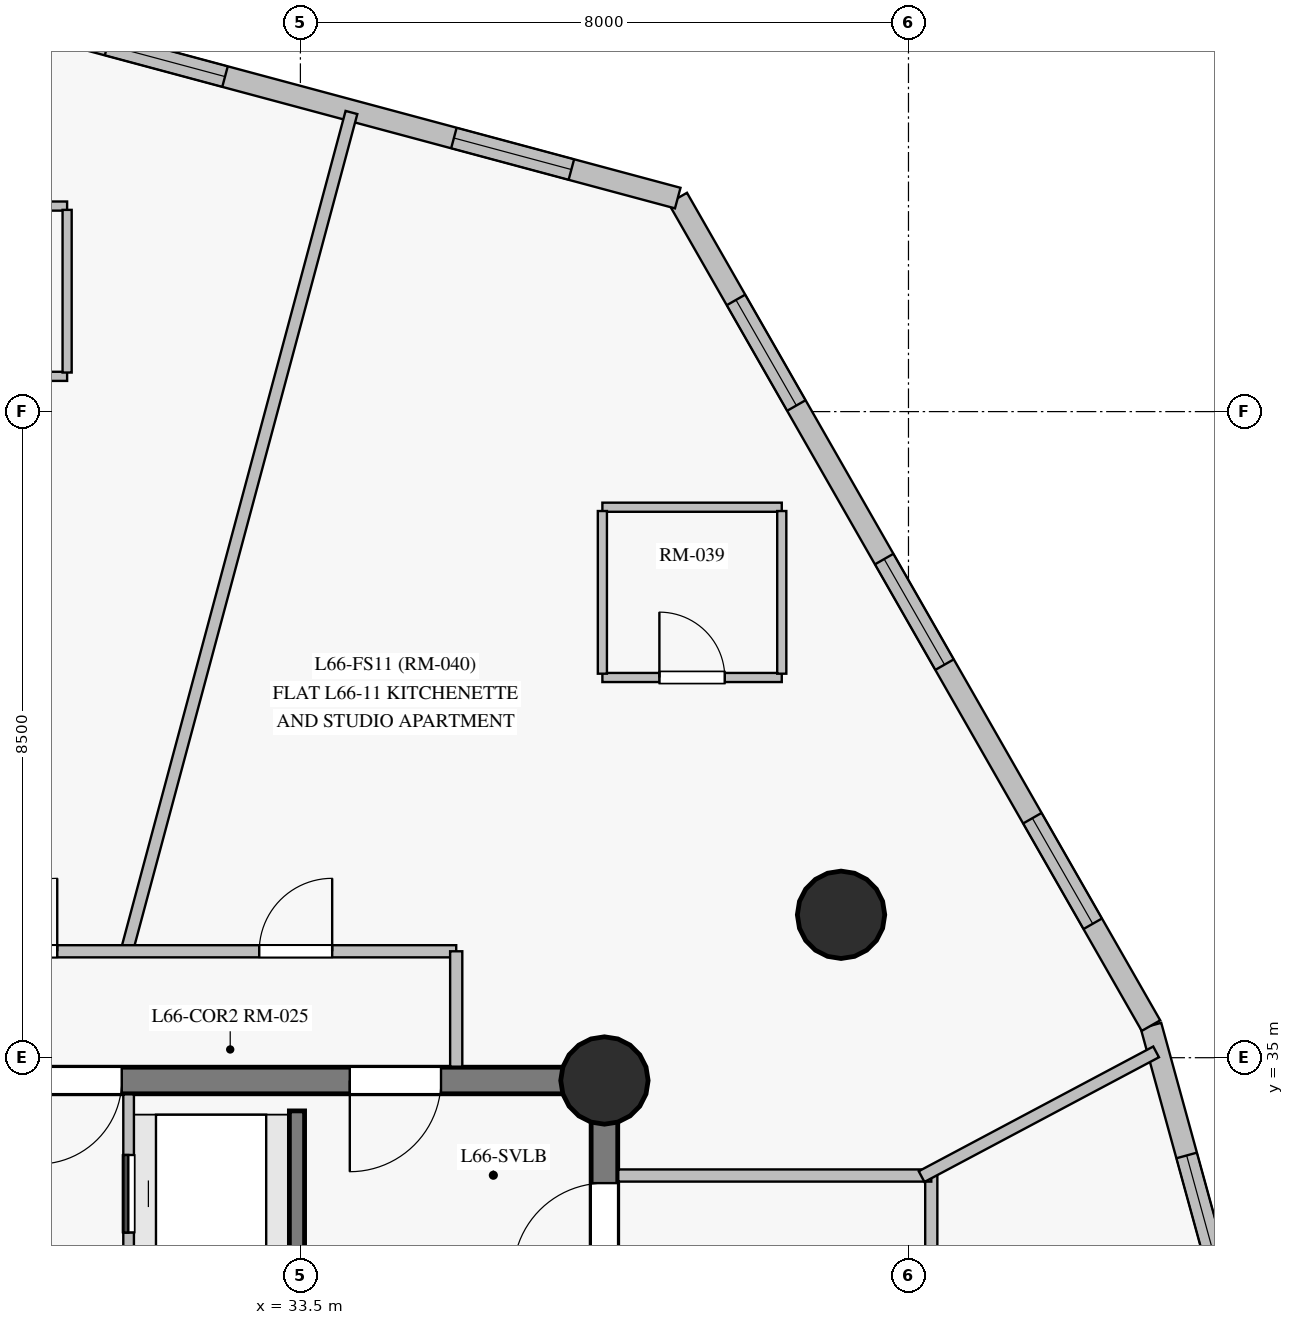
"""IFC4 building model, lengths in metres.
Left out: names, types, materials, properties, quantities, classifications, styles, units other than length and angle.
Written with IfcOpenShell. Run it as: python <this file> out.ifc"""

import sys

from ifc_helpers import new_model, si_unit, direction, frame, frame_2d, origin, origin_with_axes, origin_2d, place, context, subcontext, project, spatial, rectangle, circle, extrude, source, transform, mapped, element, fill, save


model = new_model("IFC4")
c1 = context("Model", 3, precision=1e-05, world=origin(), true_north=direction((0.0, 1.0)))
c2 = subcontext(c1, "Body", "Model", "MODEL_VIEW")
j1 = project(units=[si_unit("LENGTHUNIT", "METRE"), si_unit("PLANEANGLEUNIT", "RADIAN")], contexts=[c1])
p1 = place(None, origin())
s1 = spatial("IfcSite", under=j1, at=p1, CompositionType="ELEMENT")
p2 = place(p1, origin())
s2 = spatial("IfcBuilding", under=s1, at=p2, CompositionType="ELEMENT")
p3 = place(p2, frame((0.0, 0.0, 226.05)))
s3 = spatial("IfcBuildingStorey", under=s2, at=p3, CompositionType="ELEMENT", Elevation=226.05)
p4 = place(p3, frame((37.5, 18.3, 0.0), z_axis=(0.0, 0.0, 1.0), x_axis=(0.0, 1.0, 0.0)))
e1 = element("IfcWall", 1, at=p4, inside=s3, PredefinedType="SHEAR", context=c2, shape_type="SweptSolid", body=[
    extrude(rectangle(XDim=16.4, YDim=0.35, at=frame_2d((8.2, 0.0))), origin(), (0.0, 0.0, 1.0), 2.85),
])
p5 = place(p4, frame((13.85, 0.0, 0.0)))
e2 = element("IfcOpeningElement", 2, at=p5, cuts=e1, PredefinedType="OPENING", context=c2, shape_type="SweptSolid", body=[
    extrude(rectangle(XDim=1.2, YDim=2.15, at=frame_2d((0.6, 1.075))), frame((0.0, 0.185, 0.0), z_axis=(0.0, -1.0, 0.0), x_axis=(1.0, 0.0, 0.0)), (0.0, 0.0, 1.0), 0.37),
])
p6 = place(p3, frame((37.5, 34.7, 0.0), z_axis=(0.0, 0.0, 1.0), x_axis=(-1.0, 0.0, 0.0)))
e3 = element("IfcWall", 3, at=p6, inside=s3, PredefinedType="SHEAR", context=c2, shape_type="SweptSolid", body=[
    extrude(rectangle(XDim=10.95, YDim=0.35, at=frame_2d((5.475, 0.0))), origin(), (0.0, 0.0, 1.0), 2.85),
])
p7 = place(p6, frame((2.15, 0.0, 0.0)))
e4 = element("IfcOpeningElement", 4, at=p7, cuts=e3, PredefinedType="OPENING", context=c2, shape_type="SweptSolid", body=[
    extrude(rectangle(XDim=1.2, YDim=2.15, at=frame_2d((0.6, 1.075))), frame((0.0, 0.185, 0.0), z_axis=(0.0, -1.0, 0.0), x_axis=(1.0, 0.0, 0.0)), (0.0, 0.0, 1.0), 0.37),
])
p8 = place(p6, frame((6.35, 0.0, 0.0)))
e5 = element("IfcOpeningElement", 5, at=p8, cuts=e3, PredefinedType="OPENING", context=c2, shape_type="SweptSolid", body=[
    extrude(rectangle(XDim=1.1, YDim=2.15, at=frame_2d((0.55, 1.075))), frame((0.0, 0.185, 0.0), z_axis=(0.0, -1.0, 0.0), x_axis=(1.0, 0.0, 0.0)), (0.0, 0.0, 1.0), 0.37),
])
m1 = source(origin_with_axes(), c2, "Body", "SweptSolid", [
    extrude(circle(Radius=0.575, at=origin_2d()), origin(), (0.0, 0.0, 1.0), 3.05),
])
for number, where, z_axis, x_axis in (
    (6, (37.5, 34.7, 0.0), (0.0, 0.0, 1.0), (1.0, 0.0, 0.0)),
    (7, (40.613, 36.88, 0.0), (0.0, 0.0, 1.0), (1.0, 0.0, 0.0)),
):
    element("IfcColumn", number, at=place(p3, frame(where, z_axis=z_axis, x_axis=x_axis)), inside=s3, PredefinedType="COLUMN", context=c2, shape_type="MappedRepresentation", body=[
        mapped(m1, transform((0.0, 0.0, 0.0), scale=1.0)),
    ])
p9 = place(p3, frame((46.976, 27.101, 0.0), z_axis=(0.0, 0.0, 1.0), x_axis=(-0.264883595198, 0.964280395422, 0.0)))
e8 = element("IfcWall", 8, at=p9, inside=s3, PredefinedType="SOLIDWALL", context=c2, shape_type="SweptSolid", body=[
    extrude(rectangle(XDim=8.63, YDim=0.28, at=frame_2d((4.315, 0.0))), origin(), (0.0, 0.0, 1.0), 2.85),
])
p10 = place(p9, frame((1.473, 0.0, 0.85)))
e9 = element("IfcOpeningElement", 9, at=p10, cuts=e8, PredefinedType="OPENING", context=c2, shape_type="SweptSolid", body=[
    extrude(rectangle(XDim=1.6, YDim=1.6, at=frame_2d((0.8, 0.8))), frame((0.0, 0.15, 0.0), z_axis=(0.0, -1.0, 0.0), x_axis=(1.0, 0.0, 0.0)), (0.0, 0.0, 1.0), 0.3),
])
p11 = place(p9, frame((5.258, 0.0, 0.85)))
e10 = element("IfcOpeningElement", 10, at=p11, cuts=e8, PredefinedType="OPENING", context=c2, shape_type="SweptSolid", body=[
    extrude(rectangle(XDim=1.6, YDim=1.6, at=frame_2d((0.8, 0.8))), frame((0.0, 0.15, 0.0), z_axis=(0.0, -1.0, 0.0), x_axis=(1.0, 0.0, 0.0)), (0.0, 0.0, 1.0), 0.3),
])
p12 = place(p3, frame((44.69, 35.422, 0.0), z_axis=(0.0, 0.0, 1.0), x_axis=(-0.496436598051, 0.868072983173, 0.0)))
e11 = element("IfcWall", 11, at=p12, inside=s3, PredefinedType="SOLIDWALL", context=c2, shape_type="SweptSolid", body=[
    extrude(rectangle(XDim=12.542, YDim=0.28, at=frame_2d((6.271, 0.0))), origin(), (0.0, 0.0, 1.0), 2.85),
])
p13 = place(p12, frame((1.544, 0.0, 0.85)))
e12 = element("IfcOpeningElement", 12, at=p13, cuts=e11, PredefinedType="OPENING", context=c2, shape_type="SweptSolid", body=[
    extrude(rectangle(XDim=1.6, YDim=1.6, at=frame_2d((0.8, 0.8))), frame((0.0, 0.15, 0.0), z_axis=(0.0, -1.0, 0.0), x_axis=(1.0, 0.0, 0.0)), (0.0, 0.0, 1.0), 0.3),
])
p14 = place(p12, frame((5.471, 0.0, 0.85)))
e13 = element("IfcOpeningElement", 13, at=p14, cuts=e11, PredefinedType="OPENING", context=c2, shape_type="SweptSolid", body=[
    extrude(rectangle(XDim=1.6, YDim=1.6, at=frame_2d((0.8, 0.8))), frame((0.0, 0.15, 0.0), z_axis=(0.0, -1.0, 0.0), x_axis=(1.0, 0.0, 0.0)), (0.0, 0.0, 1.0), 0.3),
])
p15 = place(p12, frame((9.398, 0.0, 0.85)))
e14 = element("IfcOpeningElement", 14, at=p15, cuts=e11, PredefinedType="OPENING", context=c2, shape_type="SweptSolid", body=[
    extrude(rectangle(XDim=1.6, YDim=1.6, at=frame_2d((0.8, 0.8))), frame((0.0, 0.15, 0.0), z_axis=(0.0, -1.0, 0.0), x_axis=(1.0, 0.0, 0.0)), (0.0, 0.0, 1.0), 0.3),
])
p16 = place(p3, frame((38.464, 46.309, 0.0), z_axis=(0.0, 0.0, 1.0), x_axis=(-0.965830047026, 0.259176233983, 0.0)))
e15 = element("IfcWall", 15, at=p16, inside=s3, PredefinedType="SOLIDWALL", context=c2, shape_type="SweptSolid", body=[
    extrude(rectangle(XDim=9.555, YDim=0.28, at=frame_2d((4.778, 0.0))), origin(), (0.0, 0.0, 1.0), 2.85),
])
p17 = place(p16, frame((1.449, 0.0, 0.85)))
e16 = element("IfcOpeningElement", 16, at=p17, cuts=e15, PredefinedType="OPENING", context=c2, shape_type="SweptSolid", body=[
    extrude(rectangle(XDim=1.6, YDim=1.6, at=frame_2d((0.8, 0.8))), frame((0.0, 0.15, 0.0), z_axis=(0.0, -1.0, 0.0), x_axis=(1.0, 0.0, 0.0)), (0.0, 0.0, 1.0), 0.3),
])
p18 = place(p16, frame((6.167, 0.0, 0.85)))
e17 = element("IfcOpeningElement", 17, at=p18, cuts=e15, PredefinedType="OPENING", context=c2, shape_type="SweptSolid", body=[
    extrude(rectangle(XDim=1.6, YDim=1.6, at=frame_2d((0.8, 0.8))), frame((0.0, 0.15, 0.0), z_axis=(0.0, -1.0, 0.0), x_axis=(1.0, 0.0, 0.0)), (0.0, 0.0, 1.0), 0.3),
])
p19 = place(p3, frame((33.455, 18.7, 0.0), z_axis=(0.0, 0.0, 1.0), x_axis=(0.0, 1.0, 0.0)))
e18 = element("IfcWall", 18, at=p19, inside=s3, PredefinedType="SHEAR", context=c2, shape_type="SweptSolid", body=[
    extrude(rectangle(XDim=15.6, YDim=0.2, at=frame_2d((7.8, 0.0))), origin(), (0.0, 0.0, 1.0), 2.85),
])
p20 = place(p19, frame((2.75, 0.0, 0.0)))
e19 = element("IfcOpeningElement", 19, at=p20, cuts=e18, PredefinedType="OPENING", context=c2, shape_type="SweptSolid", body=[
    extrude(rectangle(XDim=1.15, YDim=2.15, at=frame_2d((0.575, 1.075))), frame((0.0, 0.11, 0.0), z_axis=(0.0, -1.0, 0.0), x_axis=(1.0, 0.0, 0.0)), (0.0, 0.0, 1.0), 0.22),
])
p21 = place(p19, frame((0.55, 0.0, 0.0)))
e20 = element("IfcOpeningElement", 20, at=p21, cuts=e18, PredefinedType="OPENING", context=c2, shape_type="SweptSolid", body=[
    extrude(rectangle(XDim=0.94, YDim=2.1, at=frame_2d((0.47, 1.05))), frame((0.0, 0.11, 0.0), z_axis=(0.0, -1.0, 0.0), x_axis=(1.0, 0.0, 0.0)), (0.0, 0.0, 1.0), 0.22),
])
p22 = place(p3, frame((41.8, 33.45, 0.0), z_axis=(0.0, 0.0, 1.0), x_axis=(0.0, -1.0, 0.0)))
e21 = element("IfcWall", 21, at=p22, inside=s3, PredefinedType="PARTITIONING", context=c2, shape_type="SweptSolid", body=[
    extrude(rectangle(XDim=19.6, YDim=0.16, at=frame_2d((9.8, 0.0))), origin(), (0.0, 0.0, 1.0), 2.3),
])
p23 = place(p22, frame((15.588, 0.0, 0.0)))
e22 = element("IfcOpeningElement", 22, at=p23, cuts=e21, PredefinedType="OPENING", context=c2, shape_type="SweptSolid", body=[
    extrude(rectangle(XDim=0.96, YDim=2.15, at=frame_2d((0.48, 1.075))), frame((0.0, 0.09, 0.0), z_axis=(0.0, -1.0, 0.0), x_axis=(1.0, 0.0, 0.0)), (0.0, 0.0, 1.0), 0.18),
])
p24 = place(p22, frame((9.365, 0.0, 0.0)))
e23 = element("IfcOpeningElement", 23, at=p24, cuts=e21, PredefinedType="OPENING", context=c2, shape_type="SweptSolid", body=[
    extrude(rectangle(XDim=0.96, YDim=2.15, at=frame_2d((0.48, 1.075))), frame((0.0, 0.09, 0.0), z_axis=(0.0, -1.0, 0.0), x_axis=(1.0, 0.0, 0.0)), (0.0, 0.0, 1.0), 0.18),
])
p25 = place(p22, frame((6.385, 0.0, 0.0)))
e24 = element("IfcOpeningElement", 24, at=p25, cuts=e21, PredefinedType="OPENING", context=c2, shape_type="SweptSolid", body=[
    extrude(rectangle(XDim=0.96, YDim=2.15, at=frame_2d((0.48, 1.075))), frame((0.0, 0.09, 0.0), z_axis=(0.0, -1.0, 0.0), x_axis=(1.0, 0.0, 0.0)), (0.0, 0.0, 1.0), 0.18),
])
p26 = place(p3, frame((31.207, 36.371, 0.0), z_axis=(0.0, 0.0, 1.0), x_axis=(0.258815277627, 0.965926835773, 0.0)))
e25 = element("IfcWall", 25, at=p26, inside=s3, PredefinedType="PARTITIONING", context=c2, shape_type="SweptSolid", body=[
    extrude(rectangle(XDim=11.455, YDim=0.16, at=frame_2d((5.727, 0.0))), origin(), (0.0, 0.0, 1.0), 2.85),
])
p27 = place(p3, frame((28.6, 36.4, 0.0), z_axis=(0.0, 0.0, 1.0), x_axis=(1.0, 0.0, 0.0)))
e26 = element("IfcWall", 26, at=p27, inside=s3, PredefinedType="PARTITIONING", context=c2, shape_type="SweptSolid", body=[
    extrude(rectangle(XDim=6.95, YDim=0.16, at=frame_2d((3.475, 0.0))), origin(), (0.0, 0.0, 1.0), 2.45),
])
p28 = place(p27, frame((4.358, 0.0, 0.0)))
e27 = element("IfcOpeningElement", 27, at=p28, cuts=e26, PredefinedType="OPENING", context=c2, shape_type="SweptSolid", body=[
    extrude(rectangle(XDim=0.96, YDim=2.15, at=frame_2d((0.48, 1.075))), frame((0.0, 0.09, 0.0), z_axis=(0.0, -1.0, 0.0), x_axis=(1.0, 0.0, 0.0)), (0.0, 0.0, 1.0), 0.18),
])
p29 = place(p27, frame((0.741, 0.0, 0.0)))
e28 = element("IfcOpeningElement", 28, at=p29, cuts=e26, PredefinedType="OPENING", context=c2, shape_type="SweptSolid", body=[
    extrude(rectangle(XDim=0.96, YDim=2.15, at=frame_2d((0.48, 1.075))), frame((0.0, 0.09, 0.0), z_axis=(0.0, -1.0, 0.0), x_axis=(1.0, 0.0, 0.0)), (0.0, 0.0, 1.0), 0.18),
])
p30 = place(p3, frame((37.682, 33.45, 0.0), z_axis=(0.0, 0.0, 1.0), x_axis=(1.0, 0.0, 0.0)))
e29 = element("IfcWall", 29, at=p30, inside=s3, PredefinedType="PARTITIONING", context=c2, shape_type="SweptSolid", body=[
    extrude(rectangle(XDim=4.118, YDim=0.16, at=frame_2d((2.059, 0.0))), origin(), (0.0, 0.0, 1.0), 2.85),
])
p31 = place(p3, frame((31.24, 30.45, 0.0), z_axis=(0.0, 0.0, 1.0), x_axis=(0.0, 1.0, 0.0)))
e30 = element("IfcWall", 30, at=p31, inside=s3, PredefinedType="PARTITIONING", context=c2, shape_type="SweptSolid", body=[
    extrude(rectangle(XDim=4.068, YDim=0.14, at=frame_2d((2.034, 0.0))), origin(), (0.0, 0.0, 1.0), 2.85),
])
p32 = place(p31, frame((0.35, 0.0, 0.0)))
e31 = element("IfcOpeningElement", 31, at=p32, cuts=e30, PredefinedType="OPENING", context=c2, shape_type="SweptSolid", body=[
    extrude(rectangle(XDim=1.02, YDim=2.15, at=frame_2d((0.51, 1.075))), frame((0.0, 0.08, 0.0), z_axis=(0.0, -1.0, 0.0), x_axis=(1.0, 0.0, 0.0)), (0.0, 0.0, 1.0), 0.16),
])
p33 = place(p31, frame((2.25, 0.0, 0.0)))
e32 = element("IfcOpeningElement", 32, at=p33, cuts=e30, PredefinedType="OPENING", context=c2, shape_type="SweptSolid", body=[
    extrude(rectangle(XDim=1.02, YDim=2.15, at=frame_2d((0.51, 1.075))), frame((0.0, 0.08, 0.0), z_axis=(0.0, -1.0, 0.0), x_axis=(1.0, 0.0, 0.0)), (0.0, 0.0, 1.0), 0.16),
])
p34 = place(p3, frame((41.672, 33.436, 0.0), z_axis=(0.0, 0.0, 1.0), x_axis=(0.882940173144, 0.469485516975, 0.0)))
e33 = element("IfcWall", 33, at=p34, inside=s3, PredefinedType="PARTITIONING", context=c2, shape_type="SweptSolid", body=[
    extrude(rectangle(XDim=3.495, YDim=0.16, at=frame_2d((1.747, 0.0))), origin(), (0.0, 0.0, 1.0), 2.85),
])
p35 = place(p3, frame((37.473, 40.002, 0.0), z_axis=(0.0, 0.0, 1.0), x_axis=(1.0, 0.0, 0.0)))
e34 = element("IfcWall", 34, at=p35, inside=s3, PredefinedType="PARTITIONING", context=c2, shape_type="SweptSolid", body=[
    extrude(rectangle(XDim=2.36, YDim=0.12, at=frame_2d((1.18, 0.0))), origin(), (0.0, 0.0, 1.0), 2.85),
])
p36 = place(p35, frame((0.75, 0.0, 0.0)))
e35 = element("IfcOpeningElement", 35, at=p36, cuts=e34, PredefinedType="OPENING", context=c2, shape_type="SweptSolid", body=[
    extrude(rectangle(XDim=0.86, YDim=2.1, at=frame_2d((0.43, 1.05))), frame((0.0, 0.07, 0.0), z_axis=(0.0, -1.0, 0.0), x_axis=(1.0, 0.0, 0.0)), (0.0, 0.0, 1.0), 0.14),
])
p37 = place(p3, frame((39.833, 42.242, 0.0), z_axis=(0.0, 0.0, 1.0), x_axis=(-1.0, 0.0, 0.0)))
e36 = element("IfcWall", 36, at=p37, inside=s3, PredefinedType="PARTITIONING", context=c2, shape_type="SweptSolid", body=[
    extrude(rectangle(XDim=2.36, YDim=0.12, at=frame_2d((1.18, 0.0))), origin(), (0.0, 0.0, 1.0), 2.85),
])
p38 = place(p3, frame((28.071, 43.964, 0.0), z_axis=(0.0, 0.0, 1.0), x_axis=(1.0, 0.0, 0.0)))
e37 = element("IfcWall", 37, at=p38, inside=s3, PredefinedType="PARTITIONING", context=c2, shape_type="SweptSolid", body=[
    extrude(rectangle(XDim=2.36, YDim=0.12, at=frame_2d((1.18, 0.0))), origin(), (0.0, 0.0, 1.0), 2.85),
])
p39 = place(p38, frame((0.75, 0.0, 0.0)))
e38 = element("IfcOpeningElement", 38, at=p39, cuts=e37, PredefinedType="OPENING", context=c2, shape_type="SweptSolid", body=[
    extrude(rectangle(XDim=0.86, YDim=2.1, at=frame_2d((0.43, 1.05))), frame((0.0, 0.07, 0.0), z_axis=(0.0, -1.0, 0.0), x_axis=(1.0, 0.0, 0.0)), (0.0, 0.0, 1.0), 0.14),
])
p40 = place(p3, frame((30.431, 46.204, 0.0), z_axis=(0.0, 0.0, 1.0), x_axis=(-1.0, 0.0, 0.0)))
e39 = element("IfcWall", 39, at=p40, inside=s3, PredefinedType="PARTITIONING", context=c2, shape_type="SweptSolid", body=[
    extrude(rectangle(XDim=2.36, YDim=0.12, at=frame_2d((1.18, 0.0))), origin(), (0.0, 0.0, 1.0), 2.85),
])
for number, where, z_axis, x_axis in (
    (40, (39.833, 40.052, 0.0), (0.0, 0.0, 1.0), (0.0, 1.0, 0.0)),
    (41, (37.473, 42.192, 0.0), (0.0, 0.0, 1.0), (0.0, -1.0, 0.0)),
):
    element("IfcWall", number, at=place(p3, frame(where, z_axis=z_axis, x_axis=x_axis)), inside=s3, PredefinedType="PARTITIONING", context=c2, shape_type="SweptSolid", body=[
        extrude(rectangle(XDim=2.14, YDim=0.12, at=frame_2d((1.07, 0.0))), origin(), (0.0, 0.0, 1.0), 2.85),
    ])
p41 = place(p3, frame((30.431, 44.014, 0.0), z_axis=(0.0, 0.0, 1.0), x_axis=(0.0, 1.0, 0.0)))
e42 = element("IfcWall", 42, at=p41, inside=s3, PredefinedType="PARTITIONING", context=c2, shape_type="SweptSolid", body=[
    extrude(rectangle(XDim=2.14, YDim=0.12, at=frame_2d((1.07, 0.0))), origin(), (0.0, 0.0, 1.0), 2.85),
])
p42 = place(p3, frame((35.55, 36.4, 0.0), z_axis=(0.0, 0.0, 1.0), x_axis=(0.0, -1.0, 0.0)))
e43 = element("IfcWall", 43, at=p42, inside=s3, PredefinedType="PARTITIONING", context=c2, shape_type="SweptSolid", body=[
    extrude(rectangle(XDim=1.518, YDim=0.16, at=frame_2d((0.759, 0.0))), origin(), (0.0, 0.0, 1.0), 2.85),
])
m2 = source(origin_with_axes(), c2, "Body", "SweptSolid", [
    extrude(rectangle(XDim=1.6, YDim=1.6, at=frame_2d((0.8, 0.8))), frame((0.0, 0.03, 0.0), z_axis=(0.0, -1.0, 0.0), x_axis=(1.0, 0.0, 0.0)), (0.0, 0.0, 1.0), 0.06),
])
p43 = place(p11, origin())
e44 = element("IfcWindow", 44, at=p43, inside=s3, PartitioningType="SINGLE_PANEL", PredefinedType="WINDOW", context=c2, shape_type="MappedRepresentation", body=[
    mapped(m2, transform((0.0, 0.0, 0.0), scale=1.0)),
])
fill(e10, e44)
p44 = place(p13, origin())
e45 = element("IfcWindow", 45, at=p44, inside=s3, PartitioningType="SINGLE_PANEL", PredefinedType="WINDOW", context=c2, shape_type="MappedRepresentation", body=[
    mapped(m2, transform((0.0, 0.0, 0.0), scale=1.0)),
])
fill(e12, e45)
p45 = place(p14, origin())
e46 = element("IfcWindow", 46, at=p45, inside=s3, PartitioningType="SINGLE_PANEL", PredefinedType="WINDOW", context=c2, shape_type="MappedRepresentation", body=[
    mapped(m2, transform((0.0, 0.0, 0.0), scale=1.0)),
])
fill(e13, e46)
p46 = place(p15, origin())
e47 = element("IfcWindow", 47, at=p46, inside=s3, PartitioningType="SINGLE_PANEL", PredefinedType="WINDOW", context=c2, shape_type="MappedRepresentation", body=[
    mapped(m2, transform((0.0, 0.0, 0.0), scale=1.0)),
])
fill(e14, e47)
p47 = place(p17, origin())
e48 = element("IfcWindow", 48, at=p47, inside=s3, PartitioningType="SINGLE_PANEL", PredefinedType="WINDOW", context=c2, shape_type="MappedRepresentation", body=[
    mapped(m2, transform((0.0, 0.0, 0.0), scale=1.0)),
])
fill(e16, e48)
p48 = place(p18, origin())
e49 = element("IfcWindow", 49, at=p48, inside=s3, PartitioningType="SINGLE_PANEL", PredefinedType="WINDOW", context=c2, shape_type="MappedRepresentation", body=[
    mapped(m2, transform((0.0, 0.0, 0.0), scale=1.0)),
])
fill(e17, e49)
m3 = source(origin_with_axes(), c2, "Body", "SweptSolid", [
    extrude(rectangle(XDim=1.2, YDim=2.15, at=frame_2d((0.6, 1.075))), frame((0.0, 0.025, 0.0), z_axis=(0.0, -1.0, 0.0), x_axis=(1.0, 0.0, 0.0)), (0.0, 0.0, 1.0), 0.05),
])
p49 = place(p5, origin())
e50 = element("IfcDoor", 50, at=p49, inside=s3, OperationType="SINGLE_SWING_LEFT", PredefinedType="DOOR", context=c2, shape_type="MappedRepresentation", body=[
    mapped(m3, transform((0.0, 0.0, 0.0), scale=1.0)),
])
fill(e2, e50)
p50 = place(p7, origin())
e51 = element("IfcDoor", 51, at=p50, inside=s3, OperationType="SINGLE_SWING_RIGHT", PredefinedType="DOOR", context=c2, shape_type="MappedRepresentation", body=[
    mapped(m3, transform((0.0, 0.0, 0.0), scale=1.0)),
])
fill(e4, e51)
m4 = source(origin_with_axes(), c2, "Body", "SweptSolid", [
    extrude(rectangle(XDim=1.1, YDim=2.15, at=frame_2d((0.55, 1.075))), frame((0.0, 0.025, 0.0), z_axis=(0.0, -1.0, 0.0), x_axis=(1.0, 0.0, 0.0)), (0.0, 0.0, 1.0), 0.05),
])
p51 = place(p8, origin())
e52 = element("IfcDoor", 52, at=p51, inside=s3, OperationType="SINGLE_SWING_RIGHT", PredefinedType="DOOR", context=c2, shape_type="MappedRepresentation", body=[
    mapped(m4, transform((0.0, 0.0, 0.0), scale=1.0)),
])
fill(e5, e52)
m5 = source(origin_with_axes(), c2, "Body", "SweptSolid", [
    extrude(rectangle(XDim=1.02, YDim=2.15, at=frame_2d((0.51, 1.075))), frame((0.0, 0.025, 0.0), z_axis=(0.0, -1.0, 0.0), x_axis=(1.0, 0.0, 0.0)), (0.0, 0.0, 1.0), 0.05),
])
p52 = place(p33, origin())
e53 = element("IfcDoor", 53, at=p52, inside=s3, OperationType="SLIDING_TO_LEFT", PredefinedType="DOOR", context=c2, shape_type="MappedRepresentation", body=[
    mapped(m5, transform((0.0, 0.0, 0.0), scale=1.0)),
])
fill(e32, e53)
m6 = source(origin_with_axes(), c2, "Body", "SweptSolid", [
    extrude(rectangle(XDim=0.86, YDim=2.1, at=frame_2d((0.43, 1.05))), frame((0.0, 0.025, 0.0), z_axis=(0.0, -1.0, 0.0), x_axis=(1.0, 0.0, 0.0)), (0.0, 0.0, 1.0), 0.05),
])
p53 = place(p36, origin())
e54 = element("IfcDoor", 54, at=p53, inside=s3, OperationType="SINGLE_SWING_LEFT", PredefinedType="DOOR", context=c2, shape_type="MappedRepresentation", body=[
    mapped(m6, transform((0.0, 0.0, 0.0), scale=1.0)),
])
fill(e35, e54)
m7 = source(origin_with_axes(), c2, "Body", "SweptSolid", [
    extrude(rectangle(XDim=0.96, YDim=2.15, at=frame_2d((0.48, 1.075))), frame((0.0, 0.025, 0.0), z_axis=(0.0, -1.0, 0.0), x_axis=(1.0, 0.0, 0.0)), (0.0, 0.0, 1.0), 0.05),
])
p54 = place(p28, origin())
e55 = element("IfcDoor", 55, at=p54, inside=s3, OperationType="SINGLE_SWING_RIGHT", PredefinedType="DOOR", context=c2, shape_type="MappedRepresentation", body=[
    mapped(m7, transform((0.0, 0.0, 0.0), scale=1.0)),
])
fill(e27, e55)
p55 = place(p29, origin())
e56 = element("IfcDoor", 56, at=p55, inside=s3, OperationType="SINGLE_SWING_RIGHT", PredefinedType="DOOR", context=c2, shape_type="MappedRepresentation", body=[
    mapped(m7, transform((0.0, 0.0, 0.0), scale=1.0)),
])
fill(e28, e56)
save(model, sys.argv[1])
